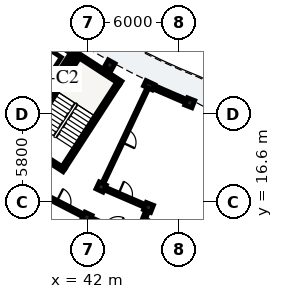
"""IFC4 building model, lengths in metres.
Left out: names, types, materials, properties, quantities, classifications, styles, units other than length and angle.
Written with IfcOpenShell. Run it as: python <this file> out.ifc"""

import sys

from ifc_helpers import new_model, si_unit, direction, frame, frame_2d, origin, origin_2d, place, context, subcontext, project, spatial, rectangle, extrude, element, fill, save


model = new_model("IFC4")
c1 = context("Model", 3, precision=1e-05, world=origin(), true_north=direction((0.0, 1.0)))
c2 = subcontext(c1, "Body", "Model", "MODEL_VIEW")
j1 = project(units=[si_unit("LENGTHUNIT", "METRE"), si_unit("PLANEANGLEUNIT", "RADIAN")], contexts=[c1])
p1 = place(None, origin())
s1 = spatial("IfcSite", under=j1, at=p1, CompositionType="ELEMENT")
p2 = place(p1, origin())
s2 = spatial("IfcBuilding", under=s1, at=p2, CompositionType="ELEMENT")
p3 = place(p2, frame((0.0, 0.0, 29.0)))
s3 = spatial("IfcBuildingStorey", under=s2, at=p3, CompositionType="ELEMENT", Elevation=29.0)
p4 = place(p3, frame((40.413, 18.882, 0.0), z_axis=(0.0, 0.0, 1.0), x_axis=(0.544629435258, 0.838676802022, 0.0)))
e1 = element("IfcWall", 1, at=p4, inside=s3, PredefinedType="SHEAR", context=c2, shape_type="SweptSolid", body=[
    extrude(rectangle(XDim=6.6, YDim=0.25, at=frame_2d((3.3, 0.0))), origin(), (0.0, 0.0, 1.0), 3.11),
])
p5 = place(p3, frame((44.18, 24.454, 0.0), z_axis=(0.0, 0.0, 1.0), x_axis=(-0.838699580527, 0.544594356953, 0.0)))
e2 = element("IfcWall", 2, at=p5, inside=s3, PredefinedType="SHEAR", context=c2, shape_type="SweptSolid", body=[
    extrude(rectangle(XDim=3.42, YDim=0.25, at=frame_2d((1.71, 0.0))), origin(), (0.0, 0.0, 1.0), 3.11),
])
p6 = place(p3, frame((40.449, 18.709, 0.0), z_axis=(0.0, 0.0, 1.0), x_axis=(-0.838678407117, 0.544626963559, 0.0)))
e3 = element("IfcWall", 3, at=p6, inside=s3, PredefinedType="SHEAR", context=c2, shape_type="SweptSolid", body=[
    extrude(rectangle(XDim=3.42, YDim=0.25, at=frame_2d((1.71, 0.0))), origin(), (0.0, 0.0, 1.0), 3.11),
])
p7 = place(p3, frame((37.754, 20.608, 0.0), z_axis=(0.0, 0.0, 1.0), x_axis=(0.544655453679, 0.838659905312, 0.0)))
e4 = element("IfcWall", 4, at=p7, inside=s3, PredefinedType="SHEAR", context=c2, shape_type="SweptSolid", body=[
    extrude(rectangle(XDim=6.6, YDim=0.25, at=frame_2d((3.3, 0.0))), origin(), (0.0, 0.0, 1.0), 3.11),
])
p8 = place(p7, frame((0.22, 0.0, 0.0)))
e5 = element("IfcOpeningElement", 5, at=p8, cuts=e4, PredefinedType="OPENING", context=c2, shape_type="SweptSolid", body=[
    extrude(rectangle(XDim=1.05, YDim=2.15, at=frame_2d((0.525, 1.075))), frame((0.0, 0.135, 0.0), z_axis=(0.0, -1.0, 0.0), x_axis=(1.0, 0.0, 0.0)), (0.0, 0.0, 1.0), 0.27),
])
p9 = place(p3, frame((41.112, 26.375, 0.0), z_axis=(0.0, 0.0, 1.0), x_axis=(-0.838638623546, 0.544688221919, 0.0)))
e6 = element("IfcWall", 6, at=p9, inside=s3, PredefinedType="SHEAR", context=c2, shape_type="SweptSolid", body=[
    extrude(rectangle(XDim=3.26, YDim=0.23, at=frame_2d((1.63, 0.0))), origin(), (0.0, 0.0, 1.0), 3.11),
])
p10 = place(p3, frame((39.482, 24.077, 0.0), z_axis=(0.0, 0.0, 1.0), x_axis=(0.544686387605, 0.838639814913, 0.0)))
e7 = element("IfcWall", 7, at=p10, inside=s3, PredefinedType="SHEAR", context=c2, shape_type="SweptSolid", body=[
    extrude(rectangle(XDim=2.7, YDim=0.23, at=frame_2d((1.35, 0.0))), origin(), (0.0, 0.0, 1.0), 3.11),
])
p11 = place(p3, frame((43.45, 25.623, 0.0), z_axis=(0.0, 0.0, 1.0), x_axis=(-0.484809620246, -0.874619707139, 0.0)))
e8 = element("IfcColumn", 8, at=p11, inside=s3, PredefinedType="COLUMN", context=c2, shape_type="SweptSolid", body=[
    extrude(rectangle(XDim=0.51, YDim=0.51, at=origin_2d()), origin(), (0.0, 0.0, 1.0), 3.115),
])
p12 = place(p3, frame((46.039, 24.297, 0.0), z_axis=(0.0, 0.0, 1.0), x_axis=(-0.426568739901, -0.904455145454, 0.0)))
e9 = element("IfcColumn", 9, at=p12, inside=s3, PredefinedType="PILASTER", context=c2, shape_type="SweptSolid", body=[
    extrude(rectangle(XDim=0.39, YDim=0.63, at=origin_2d()), origin(), (0.0, 0.0, 1.0), 3.115),
])
for number, where, z_axis, x_axis in (
    (10, (42.882, 17.604, 0.0), (0.0, 0.0, 1.0), (-0.427, -0.904, 0.0)),
    (11, (41.944, 15.614, 0.0), (0.0, 0.0, 1.0), (-0.427, -0.904, 0.0)),
    (12, (48.709, 23.143, 0.0), (0.0, 0.0, 1.0), (-0.367, -0.93, 0.0)),
    (13, (45.997, 16.258, 0.0), (0.0, 0.0, 1.0), (-0.367, -0.93, 0.0)),
):
    element("IfcColumn", number, at=place(p3, frame(where, z_axis=z_axis, x_axis=x_axis)), inside=s3, PredefinedType="COLUMN", context=c2, shape_type="SweptSolid", body=[
        extrude(rectangle(XDim=0.51, YDim=0.51, at=origin_2d()), origin(), (0.0, 0.0, 1.0), 3.115),
    ])
p13 = place(p3, frame((46.19, 24.231, 0.0), z_axis=(0.0, 0.0, 1.0), x_axis=(0.917932416464, -0.396736787813, 0.0)))
e14 = element("IfcWall", 14, at=p13, inside=s3, PredefinedType="SOLIDWALL", context=c2, shape_type="SweptSolid", body=[
    extrude(rectangle(XDim=2.519, YDim=0.245, at=frame_2d((1.259, 0.0))), origin(), (0.0, 0.0, 1.0), 2.355),
])
p14 = place(p13, frame((0.519, 0.0, 0.55)))
e15 = element("IfcOpeningElement", 15, at=p14, cuts=e14, PredefinedType="OPENING", context=c2, shape_type="SweptSolid", body=[
    extrude(rectangle(XDim=1.48, YDim=1.46, at=frame_2d((0.74, 0.73))), frame((0.0, 0.133, 0.0), z_axis=(0.0, -1.0, 0.0), x_axis=(1.0, 0.0, 0.0)), (0.0, 0.0, 1.0), 0.265),
])
p15 = place(p3, frame((39.107, 17.067, 0.0), z_axis=(0.0, 0.0, 1.0), x_axis=(0.890030590607, -0.45590080915, 0.0)))
e16 = element("IfcWall", 16, at=p15, inside=s3, PredefinedType="PARTITIONING", context=c2, shape_type="SweptSolid", body=[
    extrude(rectangle(XDim=2.837, YDim=0.195, at=frame_2d((1.418, 0.0))), origin(), (0.0, 0.0, 1.0), 2.37),
])
p16 = place(p15, frame((0.944, 0.0, 0.0)))
e17 = element("IfcOpeningElement", 17, at=p16, cuts=e16, PredefinedType="OPENING", context=c2, shape_type="SweptSolid", body=[
    extrude(rectangle(XDim=0.95, YDim=2.13, at=frame_2d((0.475, 1.065))), frame((0.0, 0.107, 0.0), z_axis=(0.0, -1.0, 0.0), x_axis=(1.0, 0.0, 0.0)), (0.0, 0.0, 1.0), 0.215),
])
p17 = place(p3, frame((45.868, 23.935, 0.0), z_axis=(0.0, 0.0, 1.0), x_axis=(-0.426573573579, -0.904452865728, 0.0)))
e18 = element("IfcWall", 18, at=p17, inside=s3, PredefinedType="PARTITIONING", context=c2, shape_type="SweptSolid", body=[
    extrude(rectangle(XDim=6.6, YDim=0.125, at=frame_2d((3.3, 0.0))), origin(), (0.0, 0.0, 1.0), 2.37),
])
p18 = place(p17, frame((2.845, 0.0, 0.0)))
e19 = element("IfcOpeningElement", 19, at=p18, cuts=e18, PredefinedType="OPENING", context=c2, shape_type="SweptSolid", body=[
    extrude(rectangle(XDim=0.91, YDim=2.1, at=frame_2d((0.455, 1.05))), frame((0.0, 0.073, 0.0), z_axis=(0.0, -1.0, 0.0), x_axis=(1.0, 0.0, 0.0)), (0.0, 0.0, 1.0), 0.145),
])
p19 = place(p3, frame((42.265, 15.475, 0.0), z_axis=(0.0, 0.0, 1.0), x_axis=(0.917943439406, -0.396711282991, 0.0)))
e20 = element("IfcWall", 20, at=p19, inside=s3, PredefinedType="PARTITIONING", context=c2, shape_type="SweptSolid", body=[
    extrude(rectangle(XDim=2.837, YDim=0.195, at=frame_2d((1.418, 0.0))), origin(), (0.0, 0.0, 1.0), 2.37),
])
p20 = place(p19, frame((0.954, 0.0, 0.0)))
e21 = element("IfcOpeningElement", 21, at=p20, cuts=e20, PredefinedType="OPENING", context=c2, shape_type="SweptSolid", body=[
    extrude(rectangle(XDim=0.93, YDim=2.12, at=frame_2d((0.465, 1.06))), frame((0.0, 0.107, 0.0), z_axis=(0.0, -1.0, 0.0), x_axis=(1.0, 0.0, 0.0)), (0.0, 0.0, 1.0), 0.215),
])
p21 = place(p3, frame((43.204, 17.465, 0.0), z_axis=(0.0, 0.0, 1.0), x_axis=(0.91793557165, -0.39672948756, 0.0)))
e22 = element("IfcWall", 22, at=p21, inside=s3, PredefinedType="PARTITIONING", context=c2, shape_type="SweptSolid", body=[
    extrude(rectangle(XDim=2.693, YDim=0.195, at=frame_2d((1.346, 0.0))), origin(), (0.0, 0.0, 1.0), 2.37),
])
p22 = place(p21, frame((0.882, 0.0, 0.0)))
e23 = element("IfcOpeningElement", 23, at=p22, cuts=e22, PredefinedType="OPENING", context=c2, shape_type="SweptSolid", body=[
    extrude(rectangle(XDim=0.93, YDim=2.12, at=frame_2d((0.465, 1.06))), frame((0.0, 0.107, 0.0), z_axis=(0.0, -1.0, 0.0), x_axis=(1.0, 0.0, 0.0)), (0.0, 0.0, 1.0), 0.215),
])
p23 = place(p3, frame((45.979, 16.211, 0.0), z_axis=(0.0, 0.0, 1.0), x_axis=(-0.366454372645, -0.930436022932, 0.0)))
e24 = element("IfcWall", 24, at=p23, inside=s3, PredefinedType="PARTITIONING", context=c2, shape_type="SweptSolid", body=[
    extrude(rectangle(XDim=2.1, YDim=0.195, at=frame_2d((1.05, 0.0))), origin(), (0.0, 0.0, 1.0), 2.37),
])
p24 = place(p23, frame((0.57, 0.0, 0.0)))
e25 = element("IfcOpeningElement", 25, at=p24, cuts=e24, PredefinedType="OPENING", context=c2, shape_type="SweptSolid", body=[
    extrude(rectangle(XDim=0.95, YDim=2.13, at=frame_2d((0.475, 1.065))), frame((0.0, 0.107, 0.0), z_axis=(0.0, -1.0, 0.0), x_axis=(1.0, 0.0, 0.0)), (0.0, 0.0, 1.0), 0.215),
])
p25 = place(p14, origin())
e26 = element("IfcWindow", 26, at=p25, inside=s3, PartitioningType="SINGLE_PANEL", PredefinedType="WINDOW", context=c2, shape_type="SweptSolid", body=[
    extrude(rectangle(XDim=1.48, YDim=1.46, at=frame_2d((0.74, 0.73))), frame((0.0, 0.03, 0.0), z_axis=(0.0, -1.0, 0.0), x_axis=(1.0, 0.0, 0.0)), (0.0, 0.0, 1.0), 0.06),
])
fill(e15, e26)
p26 = place(p16, origin())
e27 = element("IfcDoor", 27, at=p26, inside=s3, OperationType="SINGLE_SWING_LEFT", PredefinedType="DOOR", context=c2, shape_type="SweptSolid", body=[
    extrude(rectangle(XDim=0.95, YDim=2.13, at=frame_2d((0.475, 1.065))), frame((0.0, 0.025, 0.0), z_axis=(0.0, -1.0, 0.0), x_axis=(1.0, 0.0, 0.0)), (0.0, 0.0, 1.0), 0.05),
])
fill(e17, e27)
p27 = place(p18, origin())
e28 = element("IfcDoor", 28, at=p27, inside=s3, OperationType="SINGLE_SWING_RIGHT", PredefinedType="DOOR", context=c2, shape_type="SweptSolid", body=[
    extrude(rectangle(XDim=0.91, YDim=2.1, at=frame_2d((0.455, 1.05))), frame((0.0, 0.025, 0.0), z_axis=(0.0, -1.0, 0.0), x_axis=(1.0, 0.0, 0.0)), (0.0, 0.0, 1.0), 0.05),
])
fill(e19, e28)
p28 = place(p22, origin())
e29 = element("IfcDoor", 29, at=p28, inside=s3, OperationType="SINGLE_SWING_LEFT", PredefinedType="DOOR", context=c2, shape_type="SweptSolid", body=[
    extrude(rectangle(XDim=0.93, YDim=2.12, at=frame_2d((0.465, 1.06))), frame((0.0, 0.025, 0.0), z_axis=(0.0, -1.0, 0.0), x_axis=(1.0, 0.0, 0.0)), (0.0, 0.0, 1.0), 0.05),
])
fill(e23, e29)
p29 = place(p24, origin())
e30 = element("IfcDoor", 30, at=p29, inside=s3, OperationType="SINGLE_SWING_RIGHT", PredefinedType="DOOR", context=c2, shape_type="SweptSolid", body=[
    extrude(rectangle(XDim=0.95, YDim=2.13, at=frame_2d((0.475, 1.065))), frame((0.0, 0.025, 0.0), z_axis=(0.0, -1.0, 0.0), x_axis=(1.0, 0.0, 0.0)), (0.0, 0.0, 1.0), 0.05),
])
fill(e25, e30)
save(model, sys.argv[1])
